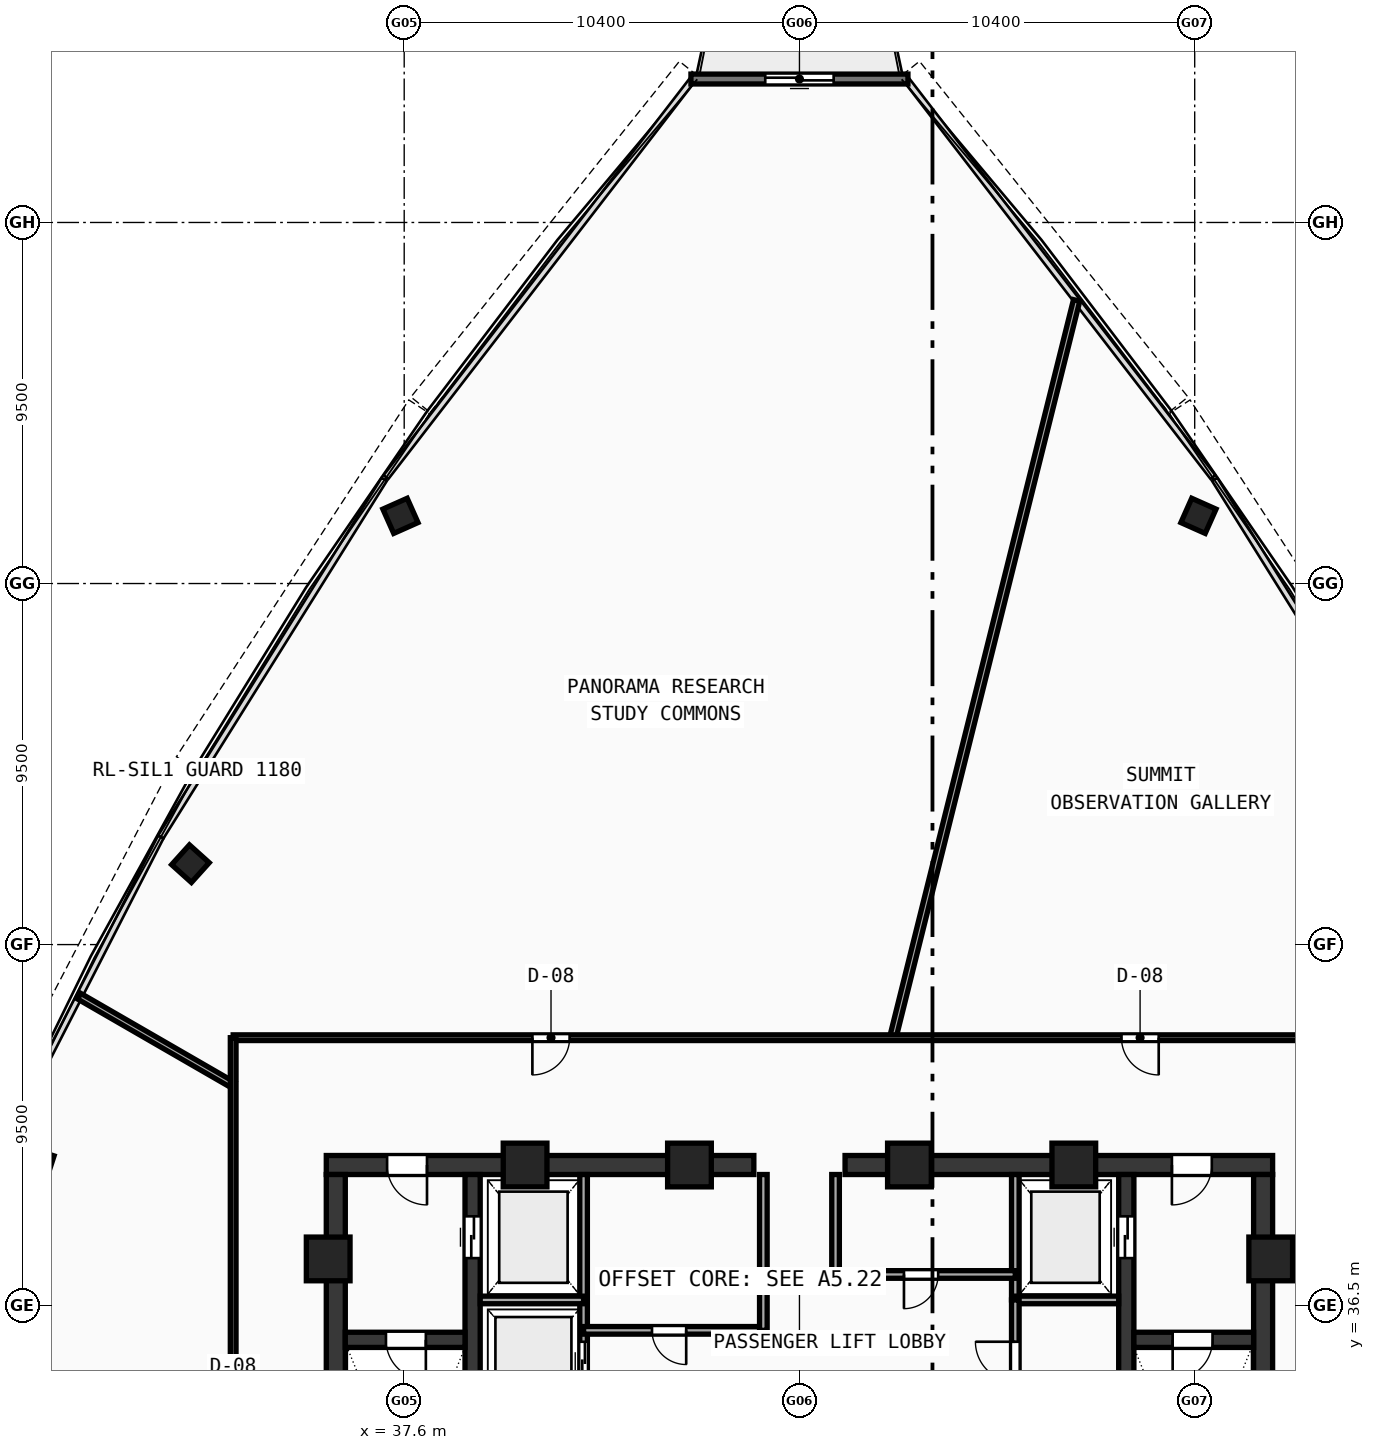
"""IFC4 building model, lengths in metres.
Left out: names, types, materials, properties, quantities, classifications, styles, units other than length and angle.
Written with IfcOpenShell. Run it as: python <this file> out.ifc"""

import sys

from ifc_helpers import new_model, si_unit, direction, frame, frame_2d, origin, origin_with_axes, origin_2d, place, context, subcontext, project, spatial, rectangle, hollow_rectangle, extrude, source, transform, mapped, element, fill, save


model = new_model("IFC4")
c1 = context("Model", 3, precision=1e-05, world=origin(), true_north=direction((0.0, 1.0)))
c2 = subcontext(c1, "Body", "Model", "MODEL_VIEW")
j1 = project(units=[si_unit("LENGTHUNIT", "METRE"), si_unit("PLANEANGLEUNIT", "RADIAN")], contexts=[c1])
p1 = place(None, origin())
s1 = spatial("IfcSite", under=j1, at=p1, CompositionType="ELEMENT")
p2 = place(p1, origin())
s2 = spatial("IfcBuilding", under=s1, at=p2, CompositionType="ELEMENT")
p3 = place(p2, frame((0.0, 0.0, 366.76)))
s3 = spatial("IfcBuildingStorey", under=s2, at=p3, CompositionType="ELEMENT", Elevation=366.76)
p4 = place(p3, frame((35.55, 40.2, 0.0), z_axis=(0.0, 0.0, 1.0), x_axis=(1.0, 0.0, 0.0)))
e1 = element("IfcWall", 1, at=p4, inside=s3, PredefinedType="SHEAR", context=c2, shape_type="SweptSolid", body=[
    extrude(rectangle(XDim=11.25, YDim=0.5, at=frame_2d((5.625, 0.0))), origin(), (0.0, 0.0, 1.0), 4.72),
])
p5 = place(p4, frame((1.6, 0.0, 0.0)))
e2 = element("IfcOpeningElement", 2, at=p5, cuts=e1, PredefinedType="OPENING", context=c2, shape_type="SweptSolid", body=[
    extrude(rectangle(XDim=1.05, YDim=2.1, at=frame_2d((0.525, 1.05))), frame((0.0, 0.26, 0.0), z_axis=(0.0, -1.0, 0.0), x_axis=(1.0, 0.0, 0.0)), (0.0, 0.0, 1.0), 0.52),
])
p6 = place(p3, frame((49.2, 40.2, 0.0), z_axis=(0.0, 0.0, 1.0), x_axis=(1.0, 0.0, 0.0)))
e3 = element("IfcWall", 3, at=p6, inside=s3, PredefinedType="SHEAR", context=c2, shape_type="SweptSolid", body=[
    extrude(rectangle(XDim=11.25, YDim=0.5, at=frame_2d((5.625, 0.0))), origin(), (0.0, 0.0, 1.0), 4.72),
])
p7 = place(p6, frame((8.6, 0.0, 0.0)))
e4 = element("IfcOpeningElement", 4, at=p7, cuts=e3, PredefinedType="OPENING", context=c2, shape_type="SweptSolid", body=[
    extrude(rectangle(XDim=1.05, YDim=2.1, at=frame_2d((0.525, 1.05))), frame((0.0, 0.26, 0.0), z_axis=(0.0, -1.0, 0.0), x_axis=(1.0, 0.0, 0.0)), (0.0, 0.0, 1.0), 0.52),
])
for number, where, z_axis, x_axis in (
    (5, (35.8, 27.75, 0.0), (0.0, 0.0, 1.0), (0.0, 1.0, 0.0)),
    (6, (60.2, 27.75, 0.0), (0.0, 0.0, 1.0), (0.0, 1.0, 0.0)),
):
    element("IfcWall", number, at=place(p3, frame(where, z_axis=z_axis, x_axis=x_axis)), inside=s3, PredefinedType="SHEAR", context=c2, shape_type="SweptSolid", body=[
        extrude(rectangle(XDim=12.2, YDim=0.5, at=frame_2d((6.1, 0.0))), origin(), (0.0, 0.0, 1.0), 4.72),
    ])
p8 = place(p3, frame((39.4, 27.75, 0.0), z_axis=(0.0, 0.0, 1.0), x_axis=(0.0, 1.0, 0.0)))
e7 = element("IfcWall", 7, at=p8, inside=s3, PredefinedType="SHEAR", context=c2, shape_type="SweptSolid", body=[
    extrude(rectangle(XDim=12.2, YDim=0.4, at=frame_2d((6.1, 0.0))), origin(), (0.0, 0.0, 1.0), 4.72),
])
p9 = place(p8, frame((10.0, 0.0, 0.0)))
e8 = element("IfcOpeningElement", 8, at=p9, cuts=e7, PredefinedType="OPENING", context=c2, shape_type="SweptSolid", body=[
    extrude(rectangle(XDim=1.1, YDim=2.1, at=frame_2d((0.55, 1.05))), frame((0.0, 0.21, 0.0), z_axis=(0.0, -1.0, 0.0), x_axis=(1.0, 0.0, 0.0)), (0.0, 0.0, 1.0), 0.42),
])
p10 = place(p3, frame((56.6, 27.75, 0.0), z_axis=(0.0, 0.0, 1.0), x_axis=(0.0, 1.0, 0.0)))
e9 = element("IfcWall", 9, at=p10, inside=s3, PredefinedType="SHEAR", context=c2, shape_type="SweptSolid", body=[
    extrude(rectangle(XDim=12.2, YDim=0.4, at=frame_2d((6.1, 0.0))), origin(), (0.0, 0.0, 1.0), 4.72),
])
p11 = place(p10, frame((10.0, 0.0, 0.0)))
e10 = element("IfcOpeningElement", 10, at=p11, cuts=e9, PredefinedType="OPENING", context=c2, shape_type="SweptSolid", body=[
    extrude(rectangle(XDim=1.1, YDim=2.1, at=frame_2d((0.55, 1.05))), frame((0.0, 0.21, 0.0), z_axis=(0.0, -1.0, 0.0), x_axis=(1.0, 0.0, 0.0)), (0.0, 0.0, 1.0), 0.42),
])
p12 = place(p3, frame((36.05, 35.6, 0.0), z_axis=(0.0, 0.0, 1.0), x_axis=(1.0, 0.0, 0.0)))
e11 = element("IfcWall", 11, at=p12, inside=s3, PredefinedType="SHEAR", context=c2, shape_type="SweptSolid", body=[
    extrude(rectangle(XDim=3.15, YDim=0.4, at=frame_2d((1.575, 0.0))), origin(), (0.0, 0.0, 1.0), 4.72),
])
p13 = place(p12, frame((1.07, 0.0, 0.0)))
e12 = element("IfcOpeningElement", 12, at=p13, cuts=e11, PredefinedType="OPENING", context=c2, shape_type="SweptSolid", body=[
    extrude(rectangle(XDim=1.05, YDim=2.1, at=frame_2d((0.525, 1.05))), frame((0.0, 0.21, 0.0), z_axis=(0.0, -1.0, 0.0), x_axis=(1.0, 0.0, 0.0)), (0.0, 0.0, 1.0), 0.42),
])
p14 = place(p3, frame((56.8, 35.6, 0.0), z_axis=(0.0, 0.0, 1.0), x_axis=(1.0, 0.0, 0.0)))
e13 = element("IfcWall", 13, at=p14, inside=s3, PredefinedType="SHEAR", context=c2, shape_type="SweptSolid", body=[
    extrude(rectangle(XDim=3.15, YDim=0.4, at=frame_2d((1.575, 0.0))), origin(), (0.0, 0.0, 1.0), 4.72),
])
p15 = place(p14, frame((1.02, 0.0, 0.0)))
e14 = element("IfcOpeningElement", 14, at=p15, cuts=e13, PredefinedType="OPENING", context=c2, shape_type="SweptSolid", body=[
    extrude(rectangle(XDim=1.05, YDim=2.1, at=frame_2d((0.525, 1.05))), frame((0.0, 0.21, 0.0), z_axis=(0.0, -1.0, 0.0), x_axis=(1.0, 0.0, 0.0)), (0.0, 0.0, 1.0), 0.42),
])
m1 = source(origin(), c2, "Body", "SweptSolid", [
    extrude(hollow_rectangle(XDim=1.15, YDim=1.15, WallThickness=0.048, at=origin_2d()), origin(), (0.0, 0.0, 1.0), 5.0),
])
for number, where, z_axis, x_axis in (
    (15, (60.4, 37.729, -0.28), (0.0, 0.0, 1.0), (1.0, 0.0, 0.0)),
    (16, (55.219, 40.2, -0.28), (0.0, 0.0, 1.0), (1.0, 0.0, 0.0)),
    (17, (50.894, 40.2, -0.28), (0.0, 0.0, 1.0), (1.0, 0.0, 0.0)),
    (18, (45.106, 40.2, -0.28), (0.0, 0.0, 1.0), (1.0, 0.0, 0.0)),
    (19, (40.781, 40.2, -0.28), (0.0, 0.0, 1.0), (1.0, 0.0, 0.0)),
    (20, (35.6, 37.729, -0.28), (0.0, 0.0, 1.0), (1.0, 0.0, 0.0)),
):
    element("IfcColumn", number, at=place(p3, frame(where, z_axis=z_axis, x_axis=x_axis)), inside=s3, PredefinedType="COLUMN", context=c2, shape_type="MappedRepresentation", body=[
        mapped(m1, transform((0.0, 0.0, 0.0), scale=1.0)),
    ])
m2 = source(origin(), c2, "Body", "SweptSolid", [
    extrude(hollow_rectangle(XDim=0.7, YDim=0.7, WallThickness=0.026, at=origin_2d()), origin(), (0.0, 0.0, 1.0), 5.0),
])
for number, where, z_axis, x_axis in (
    (21, (58.499, 57.281, -0.28), (0.0, 0.0, 1.0), (-0.914, 0.407, 0.0)),
    (22, (37.501, 57.281, -0.28), (0.0, 0.0, 1.0), (-0.914, -0.407, 0.0)),
    (23, (31.975, 48.129, -0.28), (0.0, 0.0, 1.0), (-0.669, -0.743, 0.0)),
    (24, (27.947, 40.216, -0.28), (0.0, 0.0, 1.0), (-0.309, -0.951, 0.0)),
):
    element("IfcColumn", number, at=place(p3, frame(where, z_axis=z_axis, x_axis=x_axis)), inside=s3, PredefinedType="COLUMN", context=c2, shape_type="MappedRepresentation", body=[
        mapped(m2, transform((0.0, 0.0, 0.0), scale=1.0)),
    ])
p16 = place(p3, frame((50.855, 68.774, 0.0), z_axis=(0.0, 0.0, 1.0), x_axis=(-1.0, 0.0, 0.0)))
e25 = element("IfcWall", 25, at=p16, inside=s3, PredefinedType="STANDARD", context=c2, shape_type="SweptSolid", body=[
    extrude(rectangle(XDim=5.71, YDim=0.26, at=frame_2d((2.855, 0.0))), origin(), (0.0, 0.0, 1.0), 4.72),
])
p17 = place(p16, frame((1.955, 0.0, 0.0)))
e26 = element("IfcOpeningElement", 26, at=p17, cuts=e25, PredefinedType="OPENING", context=c2, shape_type="SweptSolid", body=[
    extrude(rectangle(XDim=1.8, YDim=2.15, at=frame_2d((0.9, 1.075))), frame((0.0, 0.14, 0.0), z_axis=(0.0, -1.0, 0.0), x_axis=(1.0, 0.0, 0.0)), (0.0, 0.0, 1.0), 0.28),
])
p18 = place(p3, frame((42.32, 33.5, 0.0), z_axis=(0.0, 0.0, 1.0), x_axis=(0.0, 1.0, 0.0)))
e27 = element("IfcWall", 27, at=p18, inside=s3, PredefinedType="SOLIDWALL", context=c2, shape_type="SweptSolid", body=[
    extrude(rectangle(XDim=6.45, YDim=0.2, at=frame_2d((3.225, 0.0))), origin(), (0.0, 0.0, 1.0), 4.72),
])
p19 = place(p18, frame((1.0, 0.0, 0.0)))
e28 = element("IfcOpeningElement", 28, at=p19, cuts=e27, PredefinedType="OPENING", context=c2, shape_type="SweptSolid", body=[
    extrude(rectangle(XDim=1.05, YDim=2.1, at=frame_2d((0.525, 1.05))), frame((0.0, 0.11, 0.0), z_axis=(0.0, -1.0, 0.0), x_axis=(1.0, 0.0, 0.0)), (0.0, 0.0, 1.0), 0.22),
])
p20 = place(p3, frame((39.6, 36.65, 0.0), z_axis=(0.0, 0.0, 1.0), x_axis=(1.0, 0.0, 0.0)))
e29 = element("IfcWall", 29, at=p20, inside=s3, PredefinedType="SOLIDWALL", context=c2, shape_type="SweptSolid", body=[
    extrude(rectangle(XDim=2.72, YDim=0.2, at=frame_2d((1.36, 0.0))), origin(), (0.0, 0.0, 1.0), 4.72),
])
p21 = place(p3, frame((53.68, 36.65, 0.0), z_axis=(0.0, 0.0, 1.0), x_axis=(0.0, 1.0, 0.0)))
e30 = element("IfcWall", 30, at=p21, inside=s3, PredefinedType="SOLIDWALL", context=c2, shape_type="SweptSolid", body=[
    extrude(rectangle(XDim=3.3, YDim=0.2, at=frame_2d((1.65, 0.0))), origin(), (0.0, 0.0, 1.0), 4.72),
])
p22 = place(p3, frame((53.68, 36.65, 0.0), z_axis=(0.0, 0.0, 1.0), x_axis=(1.0, 0.0, 0.0)))
e31 = element("IfcWall", 31, at=p22, inside=s3, PredefinedType="SOLIDWALL", context=c2, shape_type="SweptSolid", body=[
    extrude(rectangle(XDim=2.72, YDim=0.2, at=frame_2d((1.36, 0.0))), origin(), (0.0, 0.0, 1.0), 4.72),
])
p23 = place(p3, frame((42.32, 35.85, 0.0), z_axis=(0.0, 0.0, 1.0), x_axis=(1.0, 0.0, 0.0)))
e32 = element("IfcWall", 32, at=p23, inside=s3, PredefinedType="SOLIDWALL", context=c2, shape_type="SweptSolid", body=[
    extrude(rectangle(XDim=4.73, YDim=0.2, at=frame_2d((2.365, 0.0))), origin(), (0.0, 0.0, 1.0), 4.72),
])
p24 = place(p23, frame((1.8, 0.0, 0.0)))
e33 = element("IfcOpeningElement", 33, at=p24, cuts=e32, PredefinedType="OPENING", context=c2, shape_type="SweptSolid", body=[
    extrude(rectangle(XDim=0.9, YDim=2.1, at=frame_2d((0.45, 1.05))), frame((0.0, 0.11, 0.0), z_axis=(0.0, -1.0, 0.0), x_axis=(1.0, 0.0, 0.0)), (0.0, 0.0, 1.0), 0.22),
])
p25 = place(p3, frame((48.95, 37.32, 0.0), z_axis=(0.0, 0.0, 1.0), x_axis=(1.0, 0.0, 0.0)))
e34 = element("IfcWall", 34, at=p25, inside=s3, PredefinedType="SOLIDWALL", context=c2, shape_type="SweptSolid", body=[
    extrude(rectangle(XDim=4.73, YDim=0.2, at=frame_2d((2.365, 0.0))), origin(), (0.0, 0.0, 1.0), 4.72),
])
p26 = place(p25, frame((1.8, 0.0, 0.0)))
e35 = element("IfcOpeningElement", 35, at=p26, cuts=e34, PredefinedType="OPENING", context=c2, shape_type="SweptSolid", body=[
    extrude(rectangle(XDim=0.9, YDim=2.1, at=frame_2d((0.45, 1.05))), frame((0.0, 0.11, 0.0), z_axis=(0.0, -1.0, 0.0), x_axis=(1.0, 0.0, 0.0)), (0.0, 0.0, 1.0), 0.22),
])
p27 = place(p3, frame((47.05, 35.85, 0.0), z_axis=(0.0, 0.0, 1.0), x_axis=(0.0, 1.0, 0.0)))
e36 = element("IfcWall", 36, at=p27, inside=s3, PredefinedType="SOLIDWALL", context=c2, shape_type="SweptSolid", body=[
    extrude(rectangle(XDim=4.1, YDim=0.2, at=frame_2d((2.05, 0.0))), origin(), (0.0, 0.0, 1.0), 4.72),
])
p28 = place(p3, frame((48.95, 37.32, 0.0), z_axis=(0.0, 0.0, 1.0), x_axis=(0.0, 1.0, 0.0)))
e37 = element("IfcWall", 37, at=p28, inside=s3, PredefinedType="SOLIDWALL", context=c2, shape_type="SweptSolid", body=[
    extrude(rectangle(XDim=2.63, YDim=0.2, at=frame_2d((1.315, 0.0))), origin(), (0.0, 0.0, 1.0), 4.72),
])
p29 = place(p3, frame((53.68, 27.6, 0.0), z_axis=(0.0, 0.0, 1.0), x_axis=(0.0, 1.0, 0.0)))
e38 = element("IfcWall", 38, at=p29, inside=s3, PredefinedType="SOLIDWALL", context=c2, shape_type="SweptSolid", body=[
    extrude(rectangle(XDim=9.05, YDim=0.2, at=frame_2d((4.525, 0.0))), origin(), (0.0, 0.0, 1.0), 4.72),
])
p30 = place(p29, frame((6.9, 0.0, 0.0)))
e39 = element("IfcOpeningElement", 39, at=p30, cuts=e38, PredefinedType="OPENING", context=c2, shape_type="SweptSolid", body=[
    extrude(rectangle(XDim=1.05, YDim=2.1, at=frame_2d((0.525, 1.05))), frame((0.0, 0.11, 0.0), z_axis=(0.0, -1.0, 0.0), x_axis=(1.0, 0.0, 0.0)), (0.0, 0.0, 1.0), 0.22),
])
p31 = place(p3, frame((50.456, 43.55, 0.0), z_axis=(0.0, 0.0, 1.0), x_axis=(0.241923592063, 0.970295303299, 0.0)))
e40 = element("IfcWall", 40, at=p31, inside=s3, PredefinedType="PARTITIONING", context=c2, shape_type="SweptSolid", body=[
    extrude(rectangle(XDim=19.994, YDim=0.17, at=frame_2d((9.997, 0.0))), origin(), (0.0, 0.0, 1.0), 4.72),
])
p32 = place(p3, frame((33.1, 42.302, 0.0), z_axis=(0.0, 0.0, 1.0), x_axis=(-0.866015242679, 0.500017599138, 0.0)))
e41 = element("IfcWall", 41, at=p32, inside=s3, PredefinedType="PARTITIONING", context=c2, shape_type="SweptSolid", body=[
    extrude(rectangle(XDim=4.678, YDim=0.17, at=frame_2d((2.339, 0.0))), origin(), (0.0, 0.0, 1.0), 4.12),
])
p33 = place(p3, frame((62.9, 43.55, 0.0), z_axis=(0.0, 0.0, 1.0), x_axis=(-1.0, 0.0, 0.0)))
e42 = element("IfcWall", 42, at=p33, inside=s3, PredefinedType="PARTITIONING", context=c2, shape_type="SweptSolid", body=[
    extrude(rectangle(XDim=29.8, YDim=0.15, at=frame_2d((14.9, 0.0))), origin(), (0.0, 0.0, 1.0), 4.12),
])
p34 = place(p33, frame((5.447, 0.0, 0.0)))
e43 = element("IfcOpeningElement", 43, at=p34, cuts=e42, PredefinedType="OPENING", context=c2, shape_type="SweptSolid", body=[
    extrude(rectangle(XDim=0.98, YDim=2.12, at=frame_2d((0.49, 1.06))), frame((0.0, 0.085, 0.0), z_axis=(0.0, -1.0, 0.0), x_axis=(1.0, 0.0, 0.0)), (0.0, 0.0, 1.0), 0.17),
])
p35 = place(p33, frame((20.947, 0.0, 0.0)))
e44 = element("IfcOpeningElement", 44, at=p35, cuts=e42, PredefinedType="OPENING", context=c2, shape_type="SweptSolid", body=[
    extrude(rectangle(XDim=0.98, YDim=2.12, at=frame_2d((0.49, 1.06))), frame((0.0, 0.085, 0.0), z_axis=(0.0, -1.0, 0.0), x_axis=(1.0, 0.0, 0.0)), (0.0, 0.0, 1.0), 0.17),
])
p36 = place(p3, frame((33.1, 43.55, 0.0), z_axis=(0.0, 0.0, 1.0), x_axis=(0.0, -1.0, 0.0)))
e45 = element("IfcWall", 45, at=p36, inside=s3, PredefinedType="PARTITIONING", context=c2, shape_type="SweptSolid", body=[
    extrude(rectangle(XDim=18.65, YDim=0.15, at=frame_2d((9.325, 0.0))), origin(), (0.0, 0.0, 1.0), 4.12),
])
p37 = place(p36, frame((9.774, 0.0, 0.0)))
e46 = element("IfcOpeningElement", 46, at=p37, cuts=e45, PredefinedType="OPENING", context=c2, shape_type="SweptSolid", body=[
    extrude(rectangle(XDim=0.98, YDim=2.12, at=frame_2d((0.49, 1.06))), frame((0.0, 0.085, 0.0), z_axis=(0.0, -1.0, 0.0), x_axis=(1.0, 0.0, 0.0)), (0.0, 0.0, 1.0), 0.17),
])
m3 = source(origin(), c2, "Body", "SweptSolid", [
    extrude(rectangle(XDim=1.8, YDim=2.15, at=frame_2d((0.9, 1.075))), frame((0.0, 0.025, 0.0), z_axis=(0.0, -1.0, 0.0), x_axis=(1.0, 0.0, 0.0)), (0.0, 0.0, 1.0), 0.05),
])
p38 = place(p17, origin_with_axes())
e47 = element("IfcDoor", 47, at=p38, inside=s3, OperationType="DOUBLE_DOOR_SLIDING", PredefinedType="DOOR", context=c2, shape_type="MappedRepresentation", body=[
    mapped(m3, transform((0.0, 0.0, 0.0), scale=1.0)),
])
fill(e26, e47)
m4 = source(origin(), c2, "Body", "SweptSolid", [
    extrude(rectangle(XDim=1.05, YDim=2.1, at=frame_2d((0.525, 1.05))), frame((0.0, 0.025, 0.0), z_axis=(0.0, -1.0, 0.0), x_axis=(1.0, 0.0, 0.0)), (0.0, 0.0, 1.0), 0.05),
])
p39 = place(p13, frame((1.05, 0.0, 0.0), z_axis=(0.0, 0.0, 1.0), x_axis=(-1.0, 0.0, 0.0)))
e48 = element("IfcDoor", 48, at=p39, inside=s3, OperationType="SINGLE_SWING_LEFT", PredefinedType="DOOR", context=c2, shape_type="MappedRepresentation", body=[
    mapped(m4, transform((0.0, 0.0, 0.0), scale=1.0)),
])
fill(e12, e48)
p40 = place(p15, frame((1.05, 0.0, 0.0), z_axis=(0.0, 0.0, 1.0), x_axis=(-1.0, 0.0, 0.0)))
e49 = element("IfcDoor", 49, at=p40, inside=s3, OperationType="SINGLE_SWING_RIGHT", PredefinedType="DOOR", context=c2, shape_type="MappedRepresentation", body=[
    mapped(m4, transform((0.0, 0.0, 0.0), scale=1.0)),
])
fill(e14, e49)
p41 = place(p5, frame((1.05, 0.0, 0.0), z_axis=(0.0, 0.0, 1.0), x_axis=(-1.0, 0.0, 0.0)))
e50 = element("IfcDoor", 50, at=p41, inside=s3, OperationType="SINGLE_SWING_LEFT", PredefinedType="DOOR", context=c2, shape_type="MappedRepresentation", body=[
    mapped(m4, transform((0.0, 0.0, 0.0), scale=1.0)),
])
fill(e2, e50)
p42 = place(p7, frame((1.05, 0.0, 0.0), z_axis=(0.0, 0.0, 1.0), x_axis=(-1.0, 0.0, 0.0)))
e51 = element("IfcDoor", 51, at=p42, inside=s3, OperationType="SINGLE_SWING_RIGHT", PredefinedType="DOOR", context=c2, shape_type="MappedRepresentation", body=[
    mapped(m4, transform((0.0, 0.0, 0.0), scale=1.0)),
])
fill(e4, e51)
m5 = source(origin(), c2, "Body", "SweptSolid", [
    extrude(rectangle(XDim=1.1, YDim=2.1, at=frame_2d((0.55, 1.05))), frame((0.0, 0.025, 0.0), z_axis=(0.0, -1.0, 0.0), x_axis=(1.0, 0.0, 0.0)), (0.0, 0.0, 1.0), 0.05),
])
p43 = place(p9, frame((1.1, 0.0, 0.0), z_axis=(0.0, 0.0, 1.0), x_axis=(-1.0, 0.0, 0.0)))
e52 = element("IfcDoor", 52, at=p43, inside=s3, OperationType="DOUBLE_DOOR_SLIDING", PredefinedType="DOOR", context=c2, shape_type="MappedRepresentation", body=[
    mapped(m5, transform((0.0, 0.0, 0.0), scale=1.0)),
])
fill(e8, e52)
p44 = place(p11, origin_with_axes())
e53 = element("IfcDoor", 53, at=p44, inside=s3, OperationType="DOUBLE_DOOR_SLIDING", PredefinedType="DOOR", context=c2, shape_type="MappedRepresentation", body=[
    mapped(m5, transform((0.0, 0.0, 0.0), scale=1.0)),
])
fill(e10, e53)
p45 = place(p19, origin_with_axes())
e54 = element("IfcDoor", 54, at=p45, inside=s3, OperationType="DOUBLE_DOOR_SLIDING", PredefinedType="DOOR", context=c2, shape_type="MappedRepresentation", body=[
    mapped(m4, transform((0.0, 0.0, 0.0), scale=1.0)),
])
fill(e28, e54)
m6 = source(origin(), c2, "Body", "SweptSolid", [
    extrude(rectangle(XDim=0.9, YDim=2.1, at=frame_2d((0.45, 1.05))), frame((0.0, 0.025, 0.0), z_axis=(0.0, -1.0, 0.0), x_axis=(1.0, 0.0, 0.0)), (0.0, 0.0, 1.0), 0.05),
])
p46 = place(p24, frame((0.9, 0.0, 0.0), z_axis=(0.0, 0.0, 1.0), x_axis=(-1.0, 0.0, 0.0)))
e55 = element("IfcDoor", 55, at=p46, inside=s3, OperationType="SINGLE_SWING_LEFT", PredefinedType="DOOR", context=c2, shape_type="MappedRepresentation", body=[
    mapped(m6, transform((0.0, 0.0, 0.0), scale=1.0)),
])
fill(e33, e55)
p47 = place(p26, frame((0.9, 0.0, 0.0), z_axis=(0.0, 0.0, 1.0), x_axis=(-1.0, 0.0, 0.0)))
e56 = element("IfcDoor", 56, at=p47, inside=s3, OperationType="SINGLE_SWING_RIGHT", PredefinedType="DOOR", context=c2, shape_type="MappedRepresentation", body=[
    mapped(m6, transform((0.0, 0.0, 0.0), scale=1.0)),
])
fill(e35, e56)
p48 = place(p30, origin_with_axes())
e57 = element("IfcDoor", 57, at=p48, inside=s3, OperationType="SINGLE_SWING_RIGHT", PredefinedType="DOOR", context=c2, shape_type="MappedRepresentation", body=[
    mapped(m4, transform((0.0, 0.0, 0.0), scale=1.0)),
])
fill(e39, e57)
m7 = source(origin(), c2, "Body", "SweptSolid", [
    extrude(rectangle(XDim=0.98, YDim=2.12, at=frame_2d((0.49, 1.06))), frame((0.0, 0.025, 0.0), z_axis=(0.0, -1.0, 0.0), x_axis=(1.0, 0.0, 0.0)), (0.0, 0.0, 1.0), 0.05),
])
p49 = place(p34, origin_with_axes())
e58 = element("IfcDoor", 58, at=p49, inside=s3, OperationType="SINGLE_SWING_LEFT", PredefinedType="DOOR", context=c2, shape_type="MappedRepresentation", body=[
    mapped(m7, transform((0.0, 0.0, 0.0), scale=1.0)),
])
fill(e43, e58)
p50 = place(p35, origin_with_axes())
e59 = element("IfcDoor", 59, at=p50, inside=s3, OperationType="SINGLE_SWING_RIGHT", PredefinedType="DOOR", context=c2, shape_type="MappedRepresentation", body=[
    mapped(m7, transform((0.0, 0.0, 0.0), scale=1.0)),
])
fill(e44, e59)
save(model, sys.argv[1])
